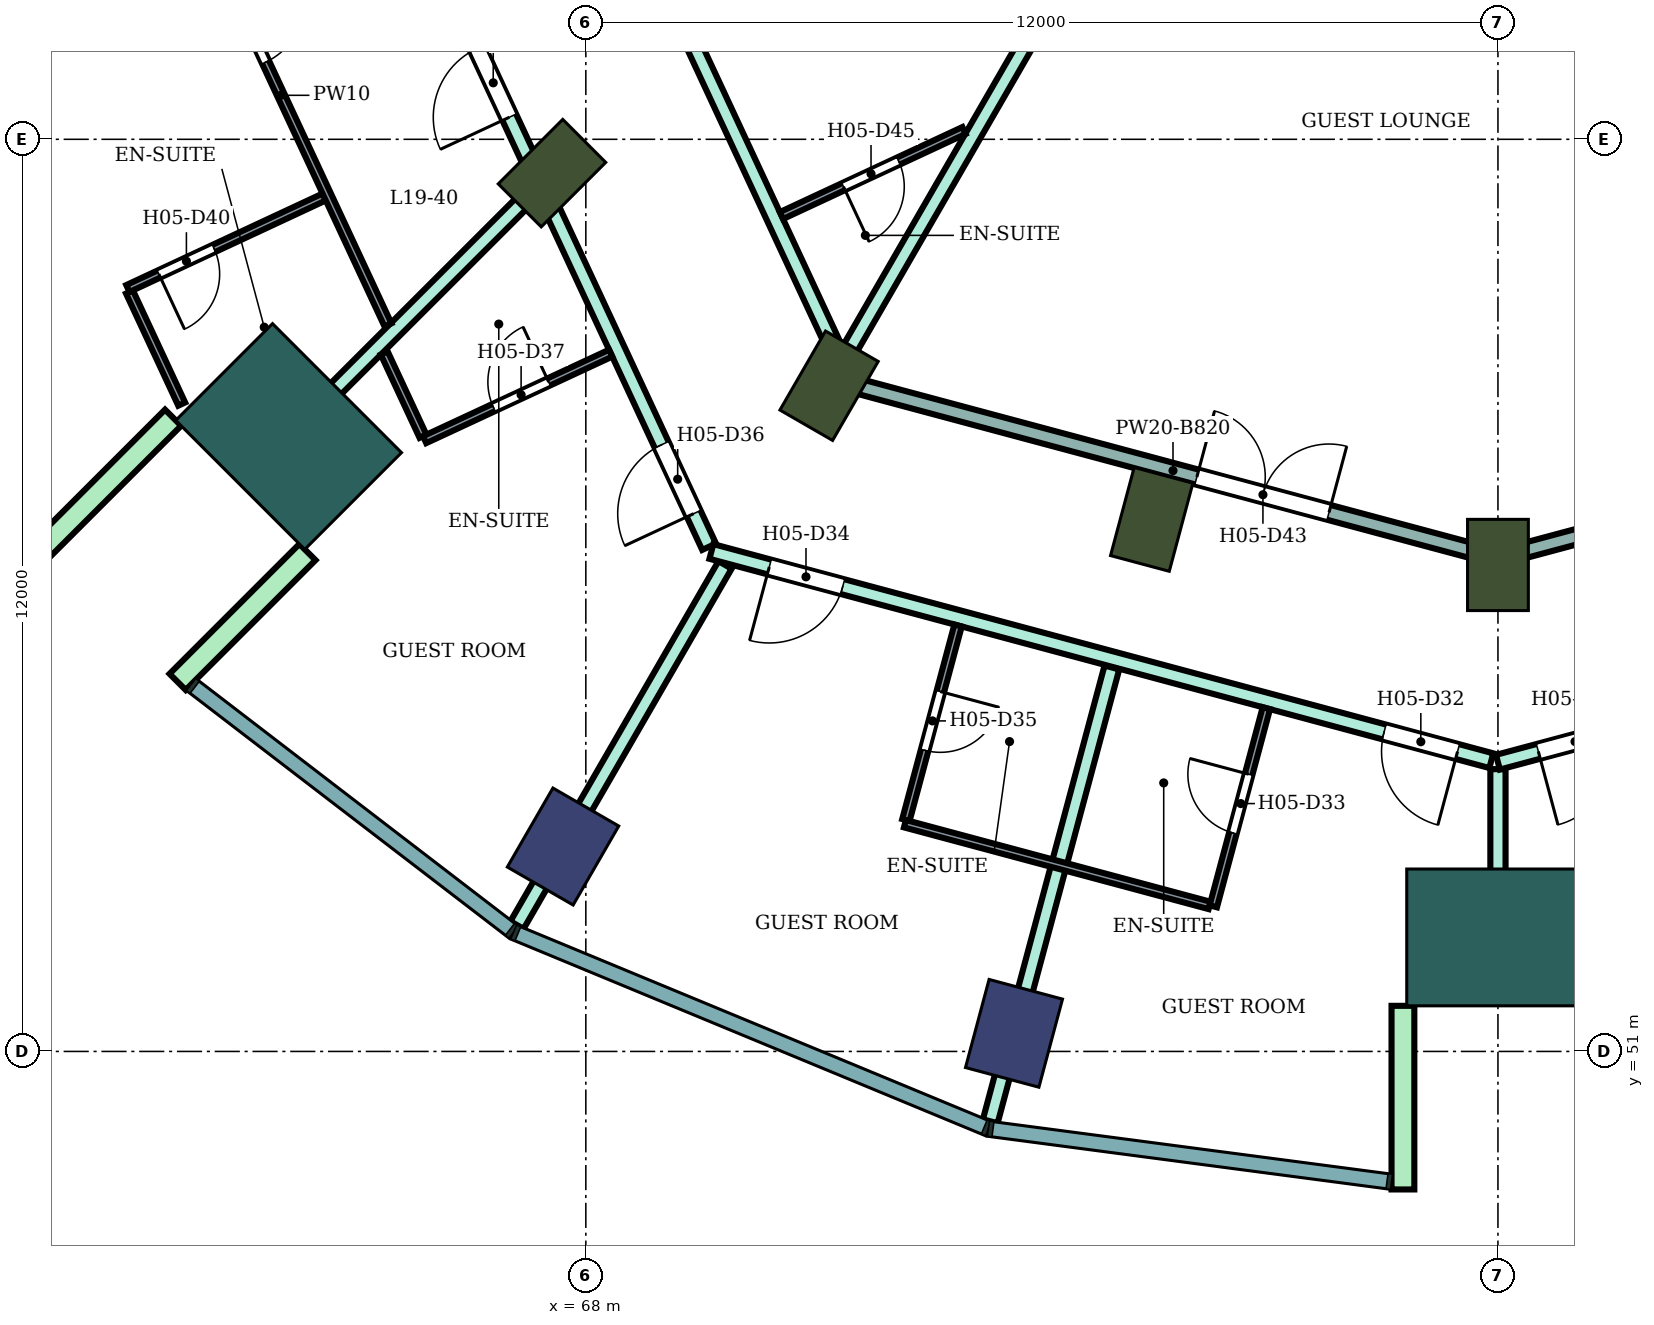
"""IFC4 building model, lengths in metres.
Left out: names, types, materials, properties, quantities, classifications, styles, units other than length and angle.
Written with IfcOpenShell. Run it as: python <this file> out.ifc"""

import sys

from ifc_helpers import new_model, si_unit, direction, frame, frame_2d, origin, origin_2d, place, context, subcontext, project, spatial, rectangle, extrude, element, fill, save


model = new_model("IFC4")
c1 = context("Model", 3, precision=1e-05, world=origin(), true_north=direction((0.0, 1.0)))
c2 = subcontext(c1, "Body", "Model", "MODEL_VIEW")
j1 = project(units=[si_unit("LENGTHUNIT", "METRE"), si_unit("PLANEANGLEUNIT", "RADIAN")], contexts=[c1])
p1 = place(None, origin())
s1 = spatial("IfcSite", under=j1, at=p1, CompositionType="ELEMENT")
p2 = place(p1, origin())
s2 = spatial("IfcBuilding", under=s1, at=p2, CompositionType="ELEMENT")
p3 = place(p2, frame((0.0, 0.0, 86.2)))
s3 = spatial("IfcBuildingStorey", under=s2, at=p3, CompositionType="ELEMENT", Elevation=86.2)
for number, where, z_axis, x_axis in (
    (1, (67.7, 53.696, 0.0), (0.0, 0.0, 1.0), (-0.5, -0.866, 0.0)),
    (2, (73.633, 51.238, 0.0), (0.0, 0.0, 1.0), (-0.259, -0.966, 0.0)),
):
    element("IfcColumn", number, at=place(p3, frame(where, z_axis=z_axis, x_axis=x_axis)), inside=s3, PredefinedType="COLUMN", context=c2, shape_type="SweptSolid", body=[
        extrude(rectangle(XDim=1.2, YDim=1.0, at=origin_2d()), origin(), (0.0, 0.0, 1.0), 3.8),
    ])
for number, where, z_axis, x_axis in (
    (3, (67.555, 62.555, 0.0), (0.0, 0.0, 1.0), (-0.707, -0.707, 0.0)),
    (4, (71.2, 59.758, 0.0), (0.0, 0.0, 1.0), (-0.5, -0.866, 0.0)),
    (5, (75.445, 58.0, 0.0), (0.0, 0.0, 1.0), (-0.259, -0.966, 0.0)),
    (6, (80.0, 57.4, 0.0), (0.0, 0.0, 1.0), (0.0, -1.0, 0.0)),
):
    element("IfcColumn", number, at=place(p3, frame(where, z_axis=z_axis, x_axis=x_axis)), inside=s3, PredefinedType="COLUMN", context=c2, shape_type="SweptSolid", body=[
        extrude(rectangle(XDim=1.2, YDim=0.8, at=origin_2d()), origin(), (0.0, 0.0, 1.0), 3.8),
    ])
for number, where, z_axis, x_axis in (
    (7, (64.09, 59.09, 0.0), (0.0, 0.0, 1.0), (-0.707, -0.707, 0.0)),
    (8, (80.0, 52.5, 0.0), (0.0, 0.0, 1.0), (0.0, -1.0, 0.0)),
):
    element("IfcColumn", number, at=place(p3, frame(where, z_axis=z_axis, x_axis=x_axis)), inside=s3, PredefinedType="COLUMN", context=c2, shape_type="SweptSolid", body=[
        extrude(rectangle(XDim=1.8, YDim=2.4, at=origin_2d()), origin(), (0.0, 0.0, 1.0), 3.8),
    ])
for number, where, z_axis, x_axis in (
    (9, (62.57, 59.338, 0.0), (0.0, 0.0, 1.0), (-0.707, -0.707, 0.0)),
    (10, (64.338, 57.57, 0.0), (0.0, 0.0, 1.0), (-0.707, -0.707, 0.0)),
    (11, (78.75, 51.6, 0.0), (0.0, 0.0, 1.0), (0.0, -1.0, 0.0)),
):
    element("IfcWall", number, at=place(p3, frame(where, z_axis=z_axis, x_axis=x_axis)), inside=s3, PredefinedType="NOTDEFINED", context=c2, shape_type="SweptSolid", body=[
        extrude(rectangle(XDim=2.416, YDim=0.3, at=frame_2d((1.208, 0.0))), origin(), (0.0, 0.0, 1.0), 3.8),
    ])
p4 = place(p3, frame((63.593, 58.599, 0.0), z_axis=(0.0, 0.0, 1.0), x_axis=(0.707292874152, 0.706920639233, 0.0)))
e12 = element("IfcWall", 12, at=p4, inside=s3, PredefinedType="PARTITIONING", context=c2, shape_type="SweptSolid", body=[
    extrude(rectangle(XDim=5.247, YDim=0.2, at=frame_2d((2.624, 0.0))), origin(), (0.0, 0.0, 1.0), 3.35),
])
p5 = place(p3, frame((66.15, 65.1, 0.0), z_axis=(0.0, 0.0, 1.0), x_axis=(0.421874842351, -0.906654078131, 0.0)))
e13 = element("IfcWall", 13, at=p5, inside=s3, PredefinedType="PARTITIONING", context=c2, shape_type="SweptSolid", body=[
    extrude(rectangle(XDim=8.228, YDim=0.2, at=frame_2d((4.114, 0.0))), origin(), (0.0, 0.0, 1.0), 3.35),
])
p6 = place(p5, frame((6.748, 0.0, 0.0)))
e14 = element("IfcOpeningElement", 14, at=p6, cuts=e13, PredefinedType="OPENING", context=c2, shape_type="SweptSolid", body=[
    extrude(rectangle(XDim=1.0, YDim=2.1, at=frame_2d((0.5, 1.05))), frame((0.0, 0.11, 0.0), z_axis=(0.0, -1.0, 0.0), x_axis=(1.0, 0.0, 0.0)), (0.0, 0.0, 1.0), 0.22),
])
p7 = place(p5, frame((0.997, 0.0, 0.0)))
e15 = element("IfcOpeningElement", 15, at=p7, cuts=e13, PredefinedType="OPENING", context=c2, shape_type="SweptSolid", body=[
    extrude(rectangle(XDim=1.0, YDim=2.1, at=frame_2d((0.5, 1.05))), frame((0.0, 0.11, 0.0), z_axis=(0.0, -1.0, 0.0), x_axis=(1.0, 0.0, 0.0)), (0.0, 0.0, 1.0), 0.22),
])
p8 = place(p3, frame((67.094, 52.663, 0.0), z_axis=(0.0, 0.0, 1.0), x_axis=(0.50023225055, 0.865891272337, 0.0)))
e16 = element("IfcWall", 16, at=p8, inside=s3, PredefinedType="PARTITIONING", context=c2, shape_type="SweptSolid", body=[
    extrude(rectangle(XDim=5.472, YDim=0.2, at=frame_2d((2.736, 0.0))), origin(), (0.0, 0.0, 1.0), 3.35),
])
p9 = place(p3, frame((68.321, 66.6, 0.0), z_axis=(0.0, 0.0, 1.0), x_axis=(0.421914092414, -0.906635813666, 0.0)))
e17 = element("IfcWall", 17, at=p9, inside=s3, PredefinedType="PARTITIONING", context=c2, shape_type="SweptSolid", body=[
    extrude(rectangle(XDim=7.459, YDim=0.2, at=frame_2d((3.73, 0.0))), origin(), (0.0, 0.0, 1.0), 3.35),
])
p10 = place(p9, frame((0.7, 0.0, 0.0)))
e18 = element("IfcOpeningElement", 18, at=p10, cuts=e17, PredefinedType="OPENING", context=c2, shape_type="SweptSolid", body=[
    extrude(rectangle(XDim=1.0, YDim=2.1, at=frame_2d((0.5, 1.05))), frame((0.0, 0.11, 0.0), z_axis=(0.0, -1.0, 0.0), x_axis=(1.0, 0.0, 0.0)), (0.0, 0.0, 1.0), 0.22),
])
p11 = place(p3, frame((69.652, 57.578, 0.0), z_axis=(0.0, 0.0, 1.0), x_axis=(0.965857425723, -0.259074184695, 0.0)))
e19 = element("IfcWall", 19, at=p11, inside=s3, PredefinedType="PARTITIONING", context=c2, shape_type="SweptSolid", body=[
    extrude(rectangle(XDim=10.623, YDim=0.2, at=frame_2d((5.312, 0.0))), origin(), (0.0, 0.0, 1.0), 3.35),
])
p12 = place(p11, frame((9.163, 0.0, 0.0)))
e20 = element("IfcOpeningElement", 20, at=p12, cuts=e19, PredefinedType="OPENING", context=c2, shape_type="SweptSolid", body=[
    extrude(rectangle(XDim=1.0, YDim=2.1, at=frame_2d((0.5, 1.05))), frame((0.0, 0.11, 0.0), z_axis=(0.0, -1.0, 0.0), x_axis=(1.0, 0.0, 0.0)), (0.0, 0.0, 1.0), 0.22),
])
p13 = place(p11, frame((0.788, 0.0, 0.0)))
e21 = element("IfcOpeningElement", 21, at=p13, cuts=e19, PredefinedType="OPENING", context=c2, shape_type="SweptSolid", body=[
    extrude(rectangle(XDim=1.0, YDim=2.1, at=frame_2d((0.5, 1.05))), frame((0.0, 0.11, 0.0), z_axis=(0.0, -1.0, 0.0), x_axis=(1.0, 0.0, 0.0)), (0.0, 0.0, 1.0), 0.22),
])
p14 = place(p3, frame((71.459, 60.218, 0.0), z_axis=(0.0, 0.0, 1.0), x_axis=(0.500232027118, 0.865891401416, 0.0)))
e22 = element("IfcWall", 22, at=p14, inside=s3, PredefinedType="PARTITIONING", context=c2, shape_type="SweptSolid", body=[
    extrude(rectangle(XDim=9.372, YDim=0.2, at=frame_2d((4.686, 0.0))), origin(), (0.0, 0.0, 1.0), 3.35),
])
p15 = place(p3, frame((71.498, 59.774, 0.0), z_axis=(0.0, 0.0, 1.0), x_axis=(0.965911938046, -0.258870871168, 0.0)))
e23 = element("IfcWall", 23, at=p15, inside=s3, PredefinedType="PARTITIONING", context=c2, shape_type="SweptSolid", body=[
    extrude(rectangle(XDim=8.752, YDim=0.2, at=frame_2d((4.376, 0.0))), origin(), (0.0, 0.0, 1.0), 2.98),
])
p16 = place(p15, frame((4.701, 0.0, 0.0)))
e24 = element("IfcOpeningElement", 24, at=p16, cuts=e23, PredefinedType="OPENING", context=c2, shape_type="SweptSolid", body=[
    extrude(rectangle(XDim=1.8, YDim=2.1, at=frame_2d((0.9, 1.05))), frame((0.0, 0.11, 0.0), z_axis=(0.0, -1.0, 0.0), x_axis=(1.0, 0.0, 0.0)), (0.0, 0.0, 1.0), 0.22),
])
p17 = place(p3, frame((73.321, 50.081, 0.0), z_axis=(0.0, 0.0, 1.0), x_axis=(0.258886797764, 0.965907669471, 0.0)))
e25 = element("IfcWall", 25, at=p17, inside=s3, PredefinedType="PARTITIONING", context=c2, shape_type="SweptSolid", body=[
    extrude(rectangle(XDim=6.181, YDim=0.2, at=frame_2d((3.09, 0.0))), origin(), (0.0, 0.0, 1.0), 3.35),
])
p18 = place(p3, frame((80.0, 51.8, 0.0), z_axis=(0.0, 0.0, 1.0), x_axis=(0.0, 1.0, 0.0)))
e26 = element("IfcWall", 26, at=p18, inside=s3, PredefinedType="PARTITIONING", context=c2, shape_type="SweptSolid", body=[
    extrude(rectangle(XDim=2.914, YDim=0.2, at=frame_2d((1.457, 0.0))), origin(), (0.0, 0.0, 1.0), 3.35),
])
p19 = place(p3, frame((80.0, 54.805, 0.0), z_axis=(0.0, 0.0, 1.0), x_axis=(0.965962177934, 0.258683340788, 0.0)))
e27 = element("IfcWall", 27, at=p19, inside=s3, PredefinedType="PARTITIONING", context=c2, shape_type="SweptSolid", body=[
    extrude(rectangle(XDim=10.643, YDim=0.2, at=frame_2d((5.322, 0.0))), origin(), (0.0, 0.0, 1.0), 3.35),
])
p20 = place(p19, frame((8.925, 0.0, 0.0)))
e28 = element("IfcOpeningElement", 28, at=p20, cuts=e27, PredefinedType="OPENING", context=c2, shape_type="SweptSolid", body=[
    extrude(rectangle(XDim=1.0, YDim=2.1, at=frame_2d((0.5, 1.05))), frame((0.0, 0.11, 0.0), z_axis=(0.0, -1.0, 0.0), x_axis=(1.0, 0.0, 0.0)), (0.0, 0.0, 1.0), 0.22),
])
p21 = place(p19, frame((0.55, 0.0, 0.0)))
e29 = element("IfcOpeningElement", 29, at=p21, cuts=e27, PredefinedType="OPENING", context=c2, shape_type="SweptSolid", body=[
    extrude(rectangle(XDim=1.0, YDim=2.1, at=frame_2d((0.5, 1.05))), frame((0.0, 0.11, 0.0), z_axis=(0.0, -1.0, 0.0), x_axis=(1.0, 0.0, 0.0)), (0.0, 0.0, 1.0), 0.22),
])
p22 = place(p3, frame((80.0, 57.496, 0.0), z_axis=(0.0, 0.0, 1.0), x_axis=(0.96592471314, 0.258823199396, 0.0)))
e30 = element("IfcWall", 30, at=p22, inside=s3, PredefinedType="PARTITIONING", context=c2, shape_type="SweptSolid", body=[
    extrude(rectangle(XDim=8.732, YDim=0.2, at=frame_2d((4.366, 0.0))), origin(), (0.0, 0.0, 1.0), 2.98),
])
p23 = place(p3, frame((61.996, 60.992, 0.0), z_axis=(0.0, 0.0, 1.0), x_axis=(0.422318684634, -0.906447421867, 0.0)))
e31 = element("IfcWall", 31, at=p23, inside=s3, PredefinedType="PARTITIONING", context=c2, shape_type="SweptSolid", body=[
    extrude(rectangle(XDim=1.627, YDim=0.1, at=frame_2d((0.814, 0.0))), origin(), (0.0, 0.0, 1.0), 3.35),
])
p24 = place(p3, frame((61.975, 61.037, 0.0), z_axis=(0.0, 0.0, 1.0), x_axis=(0.906360368959, 0.422505481125, 0.0)))
e32 = element("IfcWall", 32, at=p24, inside=s3, PredefinedType="PARTITIONING", context=c2, shape_type="SweptSolid", body=[
    extrude(rectangle(XDim=2.849, YDim=0.1, at=frame_2d((1.425, 0.0))), origin(), (0.0, 0.0, 1.0), 3.35),
])
p25 = place(p24, frame((0.45, 0.0, 0.0)))
e33 = element("IfcOpeningElement", 33, at=p25, cuts=e32, PredefinedType="OPENING", context=c2, shape_type="SweptSolid", body=[
    extrude(rectangle(XDim=0.8, YDim=2.1, at=frame_2d((0.4, 1.05))), frame((0.0, 0.06, 0.0), z_axis=(0.0, -1.0, 0.0), x_axis=(1.0, 0.0, 0.0)), (0.0, 0.0, 1.0), 0.12),
])
p26 = place(p3, frame((62.582, 66.6, 0.0), z_axis=(0.0, 0.0, 1.0), x_axis=(0.422283870085, -0.906463641337, 0.0)))
e34 = element("IfcWall", 34, at=p26, inside=s3, PredefinedType="PARTITIONING", context=c2, shape_type="SweptSolid", body=[
    extrude(rectangle(XDim=6.666, YDim=0.1, at=frame_2d((3.333, 0.0))), origin(), (0.0, 0.0, 1.0), 3.35),
])
p27 = place(p26, frame((1.953, 0.0, 0.0)))
e35 = element("IfcOpeningElement", 35, at=p27, cuts=e34, PredefinedType="OPENING", context=c2, shape_type="SweptSolid", body=[
    extrude(rectangle(XDim=0.9, YDim=2.1, at=frame_2d((0.45, 1.05))), frame((0.0, 0.06, 0.0), z_axis=(0.0, -1.0, 0.0), x_axis=(1.0, 0.0, 0.0)), (0.0, 0.0, 1.0), 0.12),
])
p28 = place(p3, frame((65.348, 60.188, 0.0), z_axis=(0.0, 0.0, 1.0), x_axis=(0.422387529151, -0.906415343657, 0.0)))
e36 = element("IfcWall", 36, at=p28, inside=s3, PredefinedType="PARTITIONING", context=c2, shape_type="SweptSolid", body=[
    extrude(rectangle(XDim=1.208, YDim=0.1, at=frame_2d((0.604, 0.0))), origin(), (0.0, 0.0, 1.0), 3.35),
])
p29 = place(p3, frame((65.879, 59.048, 0.0), z_axis=(0.0, 0.0, 1.0), x_axis=(0.906746039995, 0.421677150144, 0.0)))
e37 = element("IfcWall", 37, at=p29, inside=s3, PredefinedType="PARTITIONING", context=c2, shape_type="SweptSolid", body=[
    extrude(rectangle(XDim=2.7, YDim=0.1, at=frame_2d((1.35, 0.0))), origin(), (0.0, 0.0, 1.0), 3.35),
])
p30 = place(p29, frame((1.0, 0.0, 0.0)))
e38 = element("IfcOpeningElement", 38, at=p30, cuts=e37, PredefinedType="OPENING", context=c2, shape_type="SweptSolid", body=[
    extrude(rectangle(XDim=0.8, YDim=2.1, at=frame_2d((0.4, 1.05))), frame((0.0, 0.06, 0.0), z_axis=(0.0, -1.0, 0.0), x_axis=(1.0, 0.0, 0.0)), (0.0, 0.0, 1.0), 0.12),
])
p31 = place(p3, frame((70.574, 61.997, 0.0), z_axis=(0.0, 0.0, 1.0), x_axis=(0.906503026865, 0.422199315826, 0.0)))
e39 = element("IfcWall", 39, at=p31, inside=s3, PredefinedType="PARTITIONING", context=c2, shape_type="SweptSolid", body=[
    extrude(rectangle(XDim=2.65, YDim=0.1, at=frame_2d((1.325, 0.0))), origin(), (0.0, 0.0, 1.0), 3.35),
])
p32 = place(p31, frame((0.9, 0.0, 0.0)))
e40 = element("IfcOpeningElement", 40, at=p32, cuts=e39, PredefinedType="OPENING", context=c2, shape_type="SweptSolid", body=[
    extrude(rectangle(XDim=0.8, YDim=2.1, at=frame_2d((0.4, 1.05))), frame((0.0, 0.06, 0.0), z_axis=(0.0, -1.0, 0.0), x_axis=(1.0, 0.0, 0.0)), (0.0, 0.0, 1.0), 0.12),
])
p33 = place(p3, frame((72.211, 54.044, 0.0), z_axis=(0.0, 0.0, 1.0), x_axis=(0.258866552082, 0.96591309558, 0.0)))
e41 = element("IfcWall", 41, at=p33, inside=s3, PredefinedType="PARTITIONING", context=c2, shape_type="SweptSolid", body=[
    extrude(rectangle(XDim=2.65, YDim=0.1, at=frame_2d((1.325, 0.0))), origin(), (0.0, 0.0, 1.0), 3.35),
])
p34 = place(p33, frame((0.95, 0.0, 0.0)))
e42 = element("IfcOpeningElement", 42, at=p34, cuts=e41, PredefinedType="OPENING", context=c2, shape_type="SweptSolid", body=[
    extrude(rectangle(XDim=0.8, YDim=2.1, at=frame_2d((0.4, 1.05))), frame((0.0, 0.06, 0.0), z_axis=(0.0, -1.0, 0.0), x_axis=(1.0, 0.0, 0.0)), (0.0, 0.0, 1.0), 0.12),
])
p35 = place(p3, frame((72.198, 53.996, 0.0), z_axis=(0.0, 0.0, 1.0), x_axis=(0.965855045962, -0.259083056549, 0.0)))
e43 = element("IfcWall", 43, at=p35, inside=s3, PredefinedType="PARTITIONING", context=c2, shape_type="SweptSolid", body=[
    extrude(rectangle(XDim=4.15, YDim=0.1, at=frame_2d((2.075, 0.0))), origin(), (0.0, 0.0, 1.0), 3.35),
])
p36 = place(p3, frame((76.255, 52.909, 0.0), z_axis=(0.0, 0.0, 1.0), x_axis=(0.25867580527, 0.965964195904, 0.0)))
e44 = element("IfcWall", 44, at=p36, inside=s3, PredefinedType="PARTITIONING", context=c2, shape_type="SweptSolid", body=[
    extrude(rectangle(XDim=2.699, YDim=0.1, at=frame_2d((1.35, 0.0))), origin(), (0.0, 0.0, 1.0), 3.35),
])
p37 = place(p36, frame((1.0, 0.0, 0.0)))
e45 = element("IfcOpeningElement", 45, at=p37, cuts=e44, PredefinedType="OPENING", context=c2, shape_type="SweptSolid", body=[
    extrude(rectangle(XDim=0.8, YDim=2.1, at=frame_2d((0.4, 1.05))), frame((0.0, 0.06, 0.0), z_axis=(0.0, -1.0, 0.0), x_axis=(1.0, 0.0, 0.0)), (0.0, 0.0, 1.0), 0.12),
])
p38 = place(p21, frame((1.0, 0.0, 0.0), z_axis=(0.0, 0.0, 1.0), x_axis=(-1.0, 0.0, 0.0)))
e46 = element("IfcDoor", 46, at=p38, inside=s3, OperationType="SINGLE_SWING_RIGHT", PredefinedType="DOOR", context=c2, shape_type="SweptSolid", body=[
    extrude(rectangle(XDim=1.0, YDim=2.1, at=frame_2d((0.5, 1.05))), frame((0.0, 0.025, 0.0), z_axis=(0.0, -1.0, 0.0), x_axis=(1.0, 0.0, 0.0)), (0.0, 0.0, 1.0), 0.05),
])
fill(e29, e46)
p39 = place(p12, frame((1.0, 0.0, 0.0), z_axis=(0.0, 0.0, 1.0), x_axis=(-1.0, 0.0, 0.0)))
e47 = element("IfcDoor", 47, at=p39, inside=s3, OperationType="SINGLE_SWING_LEFT", PredefinedType="DOOR", context=c2, shape_type="SweptSolid", body=[
    extrude(rectangle(XDim=1.0, YDim=2.1, at=frame_2d((0.5, 1.05))), frame((0.0, 0.025, 0.0), z_axis=(0.0, -1.0, 0.0), x_axis=(1.0, 0.0, 0.0)), (0.0, 0.0, 1.0), 0.05),
])
fill(e20, e47)
p40 = place(p37, origin())
e48 = element("IfcDoor", 48, at=p40, inside=s3, OperationType="SINGLE_SWING_RIGHT", PredefinedType="DOOR", context=c2, shape_type="SweptSolid", body=[
    extrude(rectangle(XDim=0.8, YDim=2.1, at=frame_2d((0.4, 1.05))), frame((0.0, 0.025, 0.0), z_axis=(0.0, -1.0, 0.0), x_axis=(1.0, 0.0, 0.0)), (0.0, 0.0, 1.0), 0.05),
])
fill(e45, e48)
p41 = place(p13, frame((1.0, 0.0, 0.0), z_axis=(0.0, 0.0, 1.0), x_axis=(-1.0, 0.0, 0.0)))
e49 = element("IfcDoor", 49, at=p41, inside=s3, OperationType="SINGLE_SWING_RIGHT", PredefinedType="DOOR", context=c2, shape_type="SweptSolid", body=[
    extrude(rectangle(XDim=1.0, YDim=2.1, at=frame_2d((0.5, 1.05))), frame((0.0, 0.025, 0.0), z_axis=(0.0, -1.0, 0.0), x_axis=(1.0, 0.0, 0.0)), (0.0, 0.0, 1.0), 0.05),
])
fill(e21, e49)
p42 = place(p34, frame((0.8, 0.0, 0.0), z_axis=(0.0, 0.0, 1.0), x_axis=(-1.0, 0.0, 0.0)))
e50 = element("IfcDoor", 50, at=p42, inside=s3, OperationType="SINGLE_SWING_LEFT", PredefinedType="DOOR", context=c2, shape_type="SweptSolid", body=[
    extrude(rectangle(XDim=0.8, YDim=2.1, at=frame_2d((0.4, 1.05))), frame((0.0, 0.025, 0.0), z_axis=(0.0, -1.0, 0.0), x_axis=(1.0, 0.0, 0.0)), (0.0, 0.0, 1.0), 0.05),
])
fill(e42, e50)
p43 = place(p6, frame((1.0, 0.0, 0.0), z_axis=(0.0, 0.0, 1.0), x_axis=(-1.0, 0.0, 0.0)))
e51 = element("IfcDoor", 51, at=p43, inside=s3, OperationType="SINGLE_SWING_LEFT", PredefinedType="DOOR", context=c2, shape_type="SweptSolid", body=[
    extrude(rectangle(XDim=1.0, YDim=2.1, at=frame_2d((0.5, 1.05))), frame((0.0, 0.025, 0.0), z_axis=(0.0, -1.0, 0.0), x_axis=(1.0, 0.0, 0.0)), (0.0, 0.0, 1.0), 0.05),
])
fill(e14, e51)
p44 = place(p30, origin())
e52 = element("IfcDoor", 52, at=p44, inside=s3, OperationType="SINGLE_SWING_RIGHT", PredefinedType="DOOR", context=c2, shape_type="SweptSolid", body=[
    extrude(rectangle(XDim=0.8, YDim=2.1, at=frame_2d((0.4, 1.05))), frame((0.0, 0.025, 0.0), z_axis=(0.0, -1.0, 0.0), x_axis=(1.0, 0.0, 0.0)), (0.0, 0.0, 1.0), 0.05),
])
fill(e38, e52)
p45 = place(p7, frame((1.0, 0.0, 0.0), z_axis=(0.0, 0.0, 1.0), x_axis=(-1.0, 0.0, 0.0)))
e53 = element("IfcDoor", 53, at=p45, inside=s3, OperationType="SINGLE_SWING_LEFT", PredefinedType="DOOR", context=c2, shape_type="SweptSolid", body=[
    extrude(rectangle(XDim=1.0, YDim=2.1, at=frame_2d((0.5, 1.05))), frame((0.0, 0.025, 0.0), z_axis=(0.0, -1.0, 0.0), x_axis=(1.0, 0.0, 0.0)), (0.0, 0.0, 1.0), 0.05),
])
fill(e15, e53)
p46 = place(p27, origin())
e54 = element("IfcDoor", 54, at=p46, inside=s3, OperationType="SINGLE_SWING_LEFT", PredefinedType="DOOR", context=c2, shape_type="SweptSolid", body=[
    extrude(rectangle(XDim=0.9, YDim=2.1, at=frame_2d((0.45, 1.05))), frame((0.0, 0.025, 0.0), z_axis=(0.0, -1.0, 0.0), x_axis=(1.0, 0.0, 0.0)), (0.0, 0.0, 1.0), 0.05),
])
fill(e35, e54)
p47 = place(p25, frame((0.8, 0.0, 0.0), z_axis=(0.0, 0.0, 1.0), x_axis=(-1.0, 0.0, 0.0)))
e55 = element("IfcDoor", 55, at=p47, inside=s3, OperationType="SINGLE_SWING_RIGHT", PredefinedType="DOOR", context=c2, shape_type="SweptSolid", body=[
    extrude(rectangle(XDim=0.8, YDim=2.1, at=frame_2d((0.4, 1.05))), frame((0.0, 0.025, 0.0), z_axis=(0.0, -1.0, 0.0), x_axis=(1.0, 0.0, 0.0)), (0.0, 0.0, 1.0), 0.05),
])
fill(e33, e55)
p48 = place(p16, origin())
e56 = element("IfcDoor", 56, at=p48, inside=s3, OperationType="DOUBLE_DOOR_SINGLE_SWING", PredefinedType="DOOR", context=c2, shape_type="SweptSolid", body=[
    extrude(rectangle(XDim=1.8, YDim=2.1, at=frame_2d((0.9, 1.05))), frame((0.0, 0.025, 0.0), z_axis=(0.0, -1.0, 0.0), x_axis=(1.0, 0.0, 0.0)), (0.0, 0.0, 1.0), 0.05),
])
fill(e24, e56)
p49 = place(p32, frame((0.8, 0.0, 0.0), z_axis=(0.0, 0.0, 1.0), x_axis=(-1.0, 0.0, 0.0)))
e57 = element("IfcDoor", 57, at=p49, inside=s3, OperationType="SINGLE_SWING_RIGHT", PredefinedType="DOOR", context=c2, shape_type="SweptSolid", body=[
    extrude(rectangle(XDim=0.8, YDim=2.1, at=frame_2d((0.4, 1.05))), frame((0.0, 0.025, 0.0), z_axis=(0.0, -1.0, 0.0), x_axis=(1.0, 0.0, 0.0)), (0.0, 0.0, 1.0), 0.05),
])
fill(e40, e57)
save(model, sys.argv[1])
